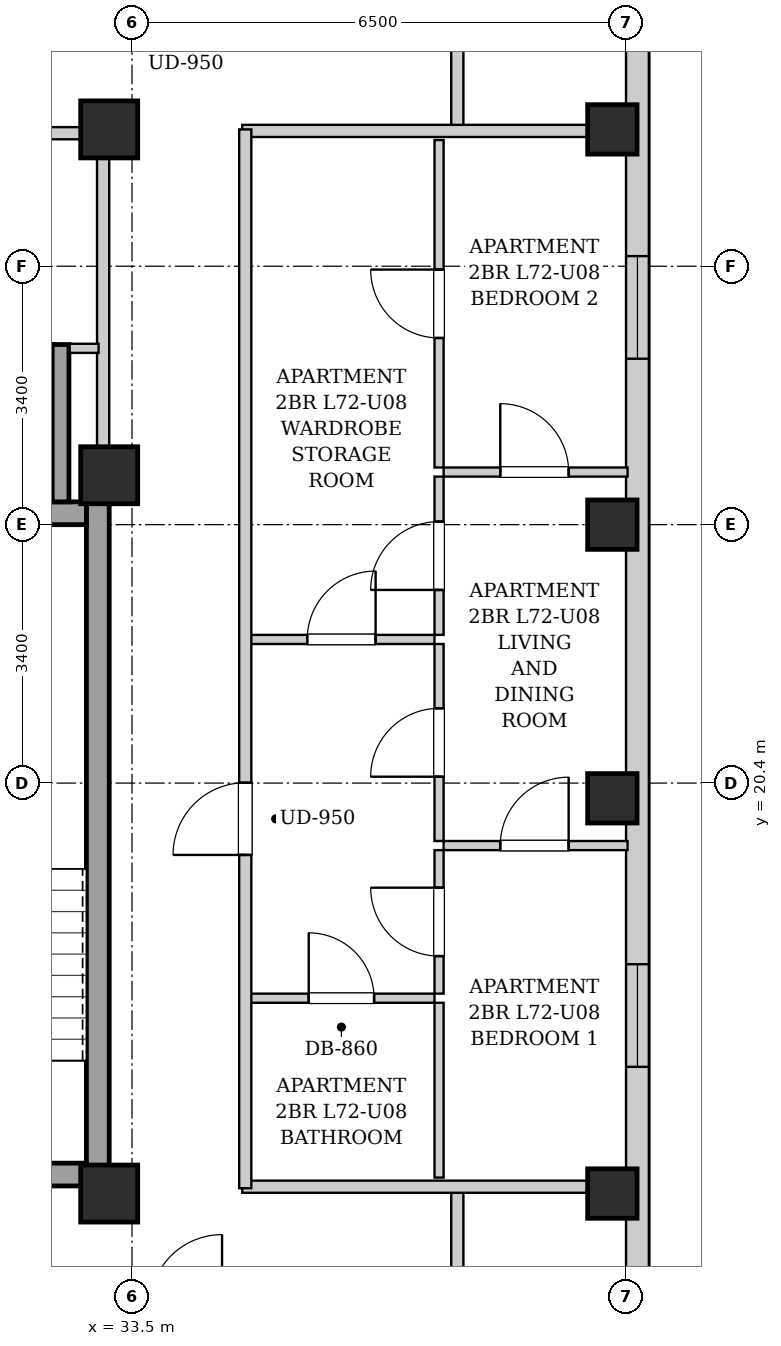
"""IFC4 building model, lengths in metres.
Left out: names, types, materials, properties, quantities, classifications, styles, units other than length and angle.
Written with IfcOpenShell. Run it as: python <this file> out.ifc"""

import sys

from ifc_helpers import new_model, si_unit, direction, frame, frame_2d, origin, origin_2d, place, context, subcontext, project, spatial, rectangle, extrude, element, fill, save


model = new_model("IFC4")
c1 = context("Model", 3, precision=1e-05, world=origin(), true_north=direction((0.0, 1.0)))
c2 = subcontext(c1, "Body", "Model", "MODEL_VIEW")
j1 = project(units=[si_unit("LENGTHUNIT", "METRE"), si_unit("PLANEANGLEUNIT", "RADIAN")], contexts=[c1])
p1 = place(None, origin())
s1 = spatial("IfcSite", under=j1, at=p1, CompositionType="ELEMENT")
p2 = place(p1, origin())
s2 = spatial("IfcBuilding", under=s1, at=p2, CompositionType="ELEMENT")
p3 = place(p2, frame((0.0, 0.0, 247.9)))
s3 = spatial("IfcBuildingStorey", under=s2, at=p3, CompositionType="ELEMENT", Elevation=247.9)
for number, where, z_axis, x_axis in (
    (1, (39.82, 15.0, 0.0), (0.0, 0.0, 1.0), (1.0, 0.0, 0.0)),
    (2, (39.82, 20.2, 0.0), (0.0, 0.0, 1.0), (1.0, 0.0, 0.0)),
    (3, (39.82, 23.8, 0.0), (0.0, 0.0, 1.0), (1.0, 0.0, 0.0)),
    (4, (39.82, 29.0, 0.0), (0.0, 0.0, 1.0), (1.0, 0.0, 0.0)),
):
    element("IfcColumn", number, at=place(p3, frame(where, z_axis=z_axis, x_axis=x_axis)), inside=s3, PredefinedType="COLUMN", context=c2, shape_type="SweptSolid", body=[
        extrude(rectangle(XDim=0.65, YDim=0.65, at=origin_2d()), origin(), (0.0, 0.0, 1.0), 3.4),
    ])
for number, where, z_axis, x_axis in (
    (5, (33.2, 15.0, 0.0), (0.0, 0.0, 1.0), (1.0, 0.0, 0.0)),
    (6, (33.2, 29.0, 0.0), (0.0, 0.0, 1.0), (1.0, 0.0, 0.0)),
    (7, (33.2, 24.45, 0.0), (0.0, 0.0, 1.0), (1.0, 0.0, 0.0)),
):
    element("IfcColumn", number, at=place(p3, frame(where, z_axis=z_axis, x_axis=x_axis)), inside=s3, PredefinedType="COLUMN", context=c2, shape_type="SweptSolid", body=[
        extrude(rectangle(XDim=0.75, YDim=0.75, at=origin_2d()), origin(), (0.0, 0.0, 1.0), 3.4),
    ])
p4 = place(p3, frame((40.15, 37.7, 0.0), z_axis=(0.0, 0.0, 1.0), x_axis=(0.0, -1.0, 0.0)))
e8 = element("IfcWall", 8, at=p4, inside=s3, PredefinedType="SOLIDWALL", context=c2, shape_type="SweptSolid", body=[
    extrude(rectangle(XDim=31.4, YDim=0.3, at=frame_2d((15.7, 0.0))), origin(), (0.0, 0.0, 1.0), 3.14),
])
p5 = place(p4, frame((28.546, 0.0, 0.55)))
e9 = element("IfcOpeningElement", 9, at=p5, cuts=e8, PredefinedType="OPENING", context=c2, shape_type="SweptSolid", body=[
    extrude(rectangle(XDim=1.35, YDim=1.2, at=frame_2d((0.675, 0.6))), frame((0.0, 0.16, 0.0), z_axis=(0.0, -1.0, 0.0), x_axis=(1.0, 0.0, 0.0)), (0.0, 0.0, 1.0), 0.32),
])
p6 = place(p4, frame((1.504, 0.0, 0.55)))
e10 = element("IfcOpeningElement", 10, at=p6, cuts=e8, PredefinedType="OPENING", context=c2, shape_type="SweptSolid", body=[
    extrude(rectangle(XDim=1.35, YDim=1.2, at=frame_2d((0.675, 0.6))), frame((0.0, 0.16, 0.0), z_axis=(0.0, -1.0, 0.0), x_axis=(1.0, 0.0, 0.0)), (0.0, 0.0, 1.0), 0.32),
])
p7 = place(p4, frame((19.683, 0.0, 0.55)))
e11 = element("IfcOpeningElement", 11, at=p7, cuts=e8, PredefinedType="OPENING", context=c2, shape_type="SweptSolid", body=[
    extrude(rectangle(XDim=1.35, YDim=1.2, at=frame_2d((0.675, 0.6))), frame((0.0, 0.16, 0.0), z_axis=(0.0, -1.0, 0.0), x_axis=(1.0, 0.0, 0.0)), (0.0, 0.0, 1.0), 0.32),
])
p8 = place(p4, frame((10.367, 0.0, 0.55)))
e12 = element("IfcOpeningElement", 12, at=p8, cuts=e8, PredefinedType="OPENING", context=c2, shape_type="SweptSolid", body=[
    extrude(rectangle(XDim=1.35, YDim=1.2, at=frame_2d((0.675, 0.6))), frame((0.0, 0.16, 0.0), z_axis=(0.0, -1.0, 0.0), x_axis=(1.0, 0.0, 0.0)), (0.0, 0.0, 1.0), 0.32),
])
p9 = place(p3, frame((33.05, 15.1, 0.0), z_axis=(0.0, 0.0, 1.0), x_axis=(0.0, 1.0, 0.0)))
e13 = element("IfcWall", 13, at=p9, inside=s3, PredefinedType="SHEAR", context=c2, shape_type="SweptSolid", body=[
    extrude(rectangle(XDim=9.0, YDim=0.3, at=frame_2d((4.5, 0.0))), origin(), (0.0, 0.0, 1.0), 3.14),
])
p10 = place(p3, frame((30.05, 23.95, 0.0), z_axis=(0.0, 0.0, 1.0), x_axis=(1.0, 0.0, 0.0)))
e14 = element("IfcWall", 14, at=p10, inside=s3, PredefinedType="SHEAR", context=c2, shape_type="SweptSolid", body=[
    extrude(rectangle(XDim=2.85, YDim=0.3, at=frame_2d((1.425, 0.0))), origin(), (0.0, 0.0, 1.0), 3.14),
])
p11 = place(p3, frame((30.05, 15.25, 0.0), z_axis=(0.0, 0.0, 1.0), x_axis=(1.0, 0.0, 0.0)))
e15 = element("IfcWall", 15, at=p11, inside=s3, PredefinedType="SHEAR", context=c2, shape_type="SweptSolid", body=[
    extrude(rectangle(XDim=2.85, YDim=0.3, at=frame_2d((1.425, 0.0))), origin(), (0.0, 0.0, 1.0), 3.14),
])
p12 = place(p11, frame((0.86, 0.0, 0.0)))
e16 = element("IfcOpeningElement", 16, at=p12, cuts=e15, PredefinedType="OPENING", context=c2, shape_type="SweptSolid", body=[
    extrude(rectangle(XDim=1.1, YDim=2.05, at=frame_2d((0.55, 1.025))), frame((0.0, 0.16, 0.0), z_axis=(0.0, -1.0, 0.0), x_axis=(1.0, 0.0, 0.0)), (0.0, 0.0, 1.0), 0.32),
])
p13 = place(p3, frame((32.56, 24.1, 0.0), z_axis=(0.0, 0.0, 1.0), x_axis=(0.0, 1.0, 0.0)))
e17 = element("IfcWall", 17, at=p13, inside=s3, PredefinedType="SHEAR", context=c2, shape_type="SweptSolid", body=[
    extrude(rectangle(XDim=2.07, YDim=0.22, at=frame_2d((1.035, 0.0))), origin(), (0.0, 0.0, 1.0), 3.14),
])
p14 = place(p3, frame((33.12, 24.12, 0.0), z_axis=(0.0, 0.0, 1.0), x_axis=(0.0, 1.0, 0.0)))
e18 = element("IfcWall", 18, at=p14, inside=s3, PredefinedType="PARTITIONING", context=c2, shape_type="SweptSolid", body=[
    extrude(rectangle(XDim=4.76, YDim=0.16, at=frame_2d((2.38, 0.0))), origin(), (0.0, 0.0, 1.0), 2.475),
])
p15 = place(p3, frame((32.68, 26.12, 0.0), z_axis=(0.0, 0.0, 1.0), x_axis=(1.0, 0.0, 0.0)))
e19 = element("IfcWall", 19, at=p15, inside=s3, PredefinedType="PARTITIONING", context=c2, shape_type="SweptSolid", body=[
    extrude(rectangle(XDim=0.38, YDim=0.12, at=frame_2d((0.19, 0.0))), origin(), (0.0, 0.0, 1.0), 3.14),
])
p16 = place(p3, frame((30.08, 28.95, 0.0), z_axis=(0.0, 0.0, 1.0), x_axis=(1.0, 0.0, 0.0)))
e20 = element("IfcWall", 20, at=p16, inside=s3, PredefinedType="PARTITIONING", context=c2, shape_type="SweptSolid", body=[
    extrude(rectangle(XDim=2.96, YDim=0.16, at=frame_2d((1.48, 0.0))), origin(), (0.0, 0.0, 1.0), 3.14),
])
p17 = place(p16, frame((1.045, 0.0, 0.0)))
e21 = element("IfcOpeningElement", 21, at=p17, cuts=e20, PredefinedType="OPENING", context=c2, shape_type="SweptSolid", body=[
    extrude(rectangle(XDim=0.86, YDim=2.05, at=frame_2d((0.43, 1.025))), frame((0.0, 0.09, 0.0), z_axis=(0.0, -1.0, 0.0), x_axis=(1.0, 0.0, 0.0)), (0.0, 0.0, 1.0), 0.18),
])
for number, where, z_axis, x_axis in (
    (22, (37.78, 13.51, 0.0), (0.0, 0.0, 1.0), (0.0, 1.0, 0.0)),
    (23, (37.78, 28.98, 0.0), (0.0, 0.0, 1.0), (0.0, 1.0, 0.0)),
):
    element("IfcWall", number, at=place(p3, frame(where, z_axis=z_axis, x_axis=x_axis)), inside=s3, PredefinedType="PARTITIONING", context=c2, shape_type="SweptSolid", body=[
        extrude(rectangle(XDim=1.58, YDim=0.16, at=frame_2d((0.79, 0.0))), origin(), (0.0, 0.0, 1.0), 3.14),
    ])
for number, where, z_axis, x_axis in (
    (24, (34.95, 15.09, 0.0), (0.0, 0.0, 1.0), (1.0, 0.0, 0.0)),
    (25, (34.95, 28.98, 0.0), (0.0, 0.0, 1.0), (1.0, 0.0, 0.0)),
):
    element("IfcWall", number, at=place(p3, frame(where, z_axis=z_axis, x_axis=x_axis)), inside=s3, PredefinedType="PARTITIONING", context=c2, shape_type="SweptSolid", body=[
        extrude(rectangle(XDim=5.07, YDim=0.16, at=frame_2d((2.535, 0.0))), origin(), (0.0, 0.0, 1.0), 2.668),
    ])
p18 = place(p3, frame((35.03, 22.29, 0.0), z_axis=(0.0, 0.0, 1.0), x_axis=(1.0, 0.0, 0.0)))
e26 = element("IfcWall", 26, at=p18, inside=s3, PredefinedType="PARTITIONING", context=c2, shape_type="SweptSolid", body=[
    extrude(rectangle(XDim=2.45, YDim=0.12, at=frame_2d((1.225, 0.0))), origin(), (0.0, 0.0, 1.0), 3.14),
])
p19 = place(p18, frame((0.775, 0.0, 0.0)))
e27 = element("IfcOpeningElement", 27, at=p19, cuts=e26, PredefinedType="OPENING", context=c2, shape_type="SweptSolid", body=[
    extrude(rectangle(XDim=0.9, YDim=2.05, at=frame_2d((0.45, 1.025))), frame((0.0, 0.07, 0.0), z_axis=(0.0, -1.0, 0.0), x_axis=(1.0, 0.0, 0.0)), (0.0, 0.0, 1.0), 0.14),
])
p20 = place(p3, frame((37.54, 22.35, 0.0), z_axis=(0.0, 0.0, 1.0), x_axis=(0.0, 1.0, 0.0)))
e28 = element("IfcWall", 28, at=p20, inside=s3, PredefinedType="PARTITIONING", context=c2, shape_type="SweptSolid", body=[
    extrude(rectangle(XDim=2.082, YDim=0.12, at=frame_2d((1.041, 0.0))), origin(), (0.0, 0.0, 1.0), 3.14),
])
p21 = place(p20, frame((0.591, 0.0, 0.0)))
e29 = element("IfcOpeningElement", 29, at=p21, cuts=e28, PredefinedType="OPENING", context=c2, shape_type="SweptSolid", body=[
    extrude(rectangle(XDim=0.9, YDim=2.05, at=frame_2d((0.45, 1.025))), frame((0.0, 0.07, 0.0), z_axis=(0.0, -1.0, 0.0), x_axis=(1.0, 0.0, 0.0)), (0.0, 0.0, 1.0), 0.14),
])
p22 = place(p3, frame((37.54, 24.552, 0.0), z_axis=(0.0, 0.0, 1.0), x_axis=(0.0, 1.0, 0.0)))
e30 = element("IfcWall", 30, at=p22, inside=s3, PredefinedType="PARTITIONING", context=c2, shape_type="SweptSolid", body=[
    extrude(rectangle(XDim=4.308, YDim=0.12, at=frame_2d((2.154, 0.0))), origin(), (0.0, 0.0, 1.0), 3.14),
])
p23 = place(p22, frame((1.704, 0.0, 0.0)))
e31 = element("IfcOpeningElement", 31, at=p23, cuts=e30, PredefinedType="OPENING", context=c2, shape_type="SweptSolid", body=[
    extrude(rectangle(XDim=0.9, YDim=2.05, at=frame_2d((0.45, 1.025))), frame((0.0, 0.07, 0.0), z_axis=(0.0, -1.0, 0.0), x_axis=(1.0, 0.0, 0.0)), (0.0, 0.0, 1.0), 0.14),
])
p24 = place(p3, frame((35.03, 17.57, 0.0), z_axis=(0.0, 0.0, 1.0), x_axis=(1.0, 0.0, 0.0)))
e32 = element("IfcWall", 32, at=p24, inside=s3, PredefinedType="PARTITIONING", context=c2, shape_type="SweptSolid", body=[
    extrude(rectangle(XDim=2.45, YDim=0.12, at=frame_2d((1.225, 0.0))), origin(), (0.0, 0.0, 1.0), 3.14),
])
p25 = place(p24, frame((0.795, 0.0, 0.0)))
e33 = element("IfcOpeningElement", 33, at=p25, cuts=e32, PredefinedType="OPENING", context=c2, shape_type="SweptSolid", body=[
    extrude(rectangle(XDim=0.86, YDim=2.05, at=frame_2d((0.43, 1.025))), frame((0.0, 0.07, 0.0), z_axis=(0.0, -1.0, 0.0), x_axis=(1.0, 0.0, 0.0)), (0.0, 0.0, 1.0), 0.14),
])
p26 = place(p3, frame((37.54, 15.21, 0.0), z_axis=(0.0, 0.0, 1.0), x_axis=(0.0, 1.0, 0.0)))
e34 = element("IfcWall", 34, at=p26, inside=s3, PredefinedType="PARTITIONING", context=c2, shape_type="SweptSolid", body=[
    extrude(rectangle(XDim=2.3, YDim=0.12, at=frame_2d((1.15, 0.0))), origin(), (0.0, 0.0, 1.0), 3.14),
])
p27 = place(p3, frame((37.54, 17.63, 0.0), z_axis=(0.0, 0.0, 1.0), x_axis=(0.0, 1.0, 0.0)))
e35 = element("IfcWall", 35, at=p27, inside=s3, PredefinedType="PARTITIONING", context=c2, shape_type="SweptSolid", body=[
    extrude(rectangle(XDim=1.888, YDim=0.12, at=frame_2d((0.944, 0.0))), origin(), (0.0, 0.0, 1.0), 3.14),
])
p28 = place(p27, frame((0.494, 0.0, 0.0)))
e36 = element("IfcOpeningElement", 36, at=p28, cuts=e35, PredefinedType="OPENING", context=c2, shape_type="SweptSolid", body=[
    extrude(rectangle(XDim=0.9, YDim=2.05, at=frame_2d((0.45, 1.025))), frame((0.0, 0.07, 0.0), z_axis=(0.0, -1.0, 0.0), x_axis=(1.0, 0.0, 0.0)), (0.0, 0.0, 1.0), 0.14),
])
p29 = place(p3, frame((37.54, 19.638, 0.0), z_axis=(0.0, 0.0, 1.0), x_axis=(0.0, 1.0, 0.0)))
e37 = element("IfcWall", 37, at=p29, inside=s3, PredefinedType="PARTITIONING", context=c2, shape_type="SweptSolid", body=[
    extrude(rectangle(XDim=2.592, YDim=0.12, at=frame_2d((1.296, 0.0))), origin(), (0.0, 0.0, 1.0), 3.14),
])
p30 = place(p29, frame((0.846, 0.0, 0.0)))
e38 = element("IfcOpeningElement", 38, at=p30, cuts=e37, PredefinedType="OPENING", context=c2, shape_type="SweptSolid", body=[
    extrude(rectangle(XDim=0.9, YDim=2.05, at=frame_2d((0.45, 1.025))), frame((0.0, 0.07, 0.0), z_axis=(0.0, -1.0, 0.0), x_axis=(1.0, 0.0, 0.0)), (0.0, 0.0, 1.0), 0.14),
])
p31 = place(p3, frame((37.6, 19.578, 0.0), z_axis=(0.0, 0.0, 1.0), x_axis=(1.0, 0.0, 0.0)))
e39 = element("IfcWall", 39, at=p31, inside=s3, PredefinedType="PARTITIONING", context=c2, shape_type="SweptSolid", body=[
    extrude(rectangle(XDim=2.42, YDim=0.12, at=frame_2d((1.21, 0.0))), origin(), (0.0, 0.0, 1.0), 3.14),
])
p32 = place(p31, frame((0.745, 0.0, 0.0)))
e40 = element("IfcOpeningElement", 40, at=p32, cuts=e39, PredefinedType="OPENING", context=c2, shape_type="SweptSolid", body=[
    extrude(rectangle(XDim=0.9, YDim=2.05, at=frame_2d((0.45, 1.025))), frame((0.0, 0.07, 0.0), z_axis=(0.0, -1.0, 0.0), x_axis=(1.0, 0.0, 0.0)), (0.0, 0.0, 1.0), 0.14),
])
p33 = place(p3, frame((37.6, 24.492, 0.0), z_axis=(0.0, 0.0, 1.0), x_axis=(1.0, 0.0, 0.0)))
e41 = element("IfcWall", 41, at=p33, inside=s3, PredefinedType="PARTITIONING", context=c2, shape_type="SweptSolid", body=[
    extrude(rectangle(XDim=2.42, YDim=0.12, at=frame_2d((1.21, 0.0))), origin(), (0.0, 0.0, 1.0), 2.878),
])
p34 = place(p33, frame((0.745, 0.0, 0.0)))
e42 = element("IfcOpeningElement", 42, at=p34, cuts=e41, PredefinedType="OPENING", context=c2, shape_type="SweptSolid", body=[
    extrude(rectangle(XDim=0.9, YDim=2.05, at=frame_2d((0.45, 1.025))), frame((0.0, 0.07, 0.0), z_axis=(0.0, -1.0, 0.0), x_axis=(1.0, 0.0, 0.0)), (0.0, 0.0, 1.0), 0.14),
])
p35 = place(p3, frame((34.99, 15.07, 0.0), z_axis=(0.0, 0.0, 1.0), x_axis=(0.0, 1.0, 0.0)))
e43 = element("IfcWall", 43, at=p35, inside=s3, PredefinedType="PARTITIONING", context=c2, shape_type="SweptSolid", body=[
    extrude(rectangle(XDim=13.93, YDim=0.16, at=frame_2d((6.965, 0.0))), origin(), (0.0, 0.0, 1.0), 3.14),
])
p36 = place(p35, frame((4.385, 0.0, 0.0)))
e44 = element("IfcOpeningElement", 44, at=p36, cuts=e43, PredefinedType="OPENING", context=c2, shape_type="SweptSolid", body=[
    extrude(rectangle(XDim=0.95, YDim=2.1, at=frame_2d((0.475, 1.05))), frame((0.0, 0.09, 0.0), z_axis=(0.0, -1.0, 0.0), x_axis=(1.0, 0.0, 0.0)), (0.0, 0.0, 1.0), 0.18),
])
p37 = place(p19, origin())
e45 = element("IfcDoor", 45, at=p37, inside=s3, OperationType="SINGLE_SWING_RIGHT", PredefinedType="DOOR", context=c2, shape_type="SweptSolid", body=[
    extrude(rectangle(XDim=0.9, YDim=2.05, at=frame_2d((0.45, 1.025))), frame((0.0, 0.025, 0.0), z_axis=(0.0, -1.0, 0.0), x_axis=(1.0, 0.0, 0.0)), (0.0, 0.0, 1.0), 0.05),
])
fill(e27, e45)
p38 = place(p21, origin())
e46 = element("IfcDoor", 46, at=p38, inside=s3, OperationType="SINGLE_SWING_LEFT", PredefinedType="DOOR", context=c2, shape_type="SweptSolid", body=[
    extrude(rectangle(XDim=0.9, YDim=2.05, at=frame_2d((0.45, 1.025))), frame((0.0, 0.025, 0.0), z_axis=(0.0, -1.0, 0.0), x_axis=(1.0, 0.0, 0.0)), (0.0, 0.0, 1.0), 0.05),
])
fill(e29, e46)
p39 = place(p23, origin())
e47 = element("IfcDoor", 47, at=p39, inside=s3, OperationType="SINGLE_SWING_RIGHT", PredefinedType="DOOR", context=c2, shape_type="SweptSolid", body=[
    extrude(rectangle(XDim=0.9, YDim=2.05, at=frame_2d((0.45, 1.025))), frame((0.0, 0.025, 0.0), z_axis=(0.0, -1.0, 0.0), x_axis=(1.0, 0.0, 0.0)), (0.0, 0.0, 1.0), 0.05),
])
fill(e31, e47)
p40 = place(p25, origin())
e48 = element("IfcDoor", 48, at=p40, inside=s3, OperationType="SINGLE_SWING_LEFT", PredefinedType="DOOR", context=c2, shape_type="SweptSolid", body=[
    extrude(rectangle(XDim=0.86, YDim=2.05, at=frame_2d((0.43, 1.025))), frame((0.0, 0.025, 0.0), z_axis=(0.0, -1.0, 0.0), x_axis=(1.0, 0.0, 0.0)), (0.0, 0.0, 1.0), 0.05),
])
fill(e33, e48)
p41 = place(p28, origin())
e49 = element("IfcDoor", 49, at=p41, inside=s3, OperationType="SINGLE_SWING_RIGHT", PredefinedType="DOOR", context=c2, shape_type="SweptSolid", body=[
    extrude(rectangle(XDim=0.9, YDim=2.05, at=frame_2d((0.45, 1.025))), frame((0.0, 0.025, 0.0), z_axis=(0.0, -1.0, 0.0), x_axis=(1.0, 0.0, 0.0)), (0.0, 0.0, 1.0), 0.05),
])
fill(e36, e49)
p42 = place(p30, origin())
e50 = element("IfcDoor", 50, at=p42, inside=s3, OperationType="SINGLE_SWING_LEFT", PredefinedType="DOOR", context=c2, shape_type="SweptSolid", body=[
    extrude(rectangle(XDim=0.9, YDim=2.05, at=frame_2d((0.45, 1.025))), frame((0.0, 0.025, 0.0), z_axis=(0.0, -1.0, 0.0), x_axis=(1.0, 0.0, 0.0)), (0.0, 0.0, 1.0), 0.05),
])
fill(e38, e50)
p43 = place(p32, origin())
e51 = element("IfcDoor", 51, at=p43, inside=s3, OperationType="SINGLE_SWING_RIGHT", PredefinedType="DOOR", context=c2, shape_type="SweptSolid", body=[
    extrude(rectangle(XDim=0.9, YDim=2.05, at=frame_2d((0.45, 1.025))), frame((0.0, 0.025, 0.0), z_axis=(0.0, -1.0, 0.0), x_axis=(1.0, 0.0, 0.0)), (0.0, 0.0, 1.0), 0.05),
])
fill(e40, e51)
p44 = place(p34, origin())
e52 = element("IfcDoor", 52, at=p44, inside=s3, OperationType="SINGLE_SWING_LEFT", PredefinedType="DOOR", context=c2, shape_type="SweptSolid", body=[
    extrude(rectangle(XDim=0.9, YDim=2.05, at=frame_2d((0.45, 1.025))), frame((0.0, 0.025, 0.0), z_axis=(0.0, -1.0, 0.0), x_axis=(1.0, 0.0, 0.0)), (0.0, 0.0, 1.0), 0.05),
])
fill(e42, e52)
p45 = place(p36, origin())
e53 = element("IfcDoor", 53, at=p45, inside=s3, OperationType="SINGLE_SWING_LEFT", PredefinedType="DOOR", context=c2, shape_type="SweptSolid", body=[
    extrude(rectangle(XDim=0.95, YDim=2.1, at=frame_2d((0.475, 1.05))), frame((0.0, 0.025, 0.0), z_axis=(0.0, -1.0, 0.0), x_axis=(1.0, 0.0, 0.0)), (0.0, 0.0, 1.0), 0.05),
])
fill(e44, e53)
p46 = place(p7, origin())
e54 = element("IfcWindow", 54, at=p46, inside=s3, PartitioningType="SINGLE_PANEL", PredefinedType="WINDOW", context=c2, shape_type="SweptSolid", body=[
    extrude(rectangle(XDim=1.35, YDim=1.2, at=frame_2d((0.675, 0.6))), frame((0.0, 0.03, 0.0), z_axis=(0.0, -1.0, 0.0), x_axis=(1.0, 0.0, 0.0)), (0.0, 0.0, 1.0), 0.06),
])
fill(e11, e54)
p47 = place(p8, origin())
e55 = element("IfcWindow", 55, at=p47, inside=s3, PartitioningType="SINGLE_PANEL", PredefinedType="WINDOW", context=c2, shape_type="SweptSolid", body=[
    extrude(rectangle(XDim=1.35, YDim=1.2, at=frame_2d((0.675, 0.6))), frame((0.0, 0.03, 0.0), z_axis=(0.0, -1.0, 0.0), x_axis=(1.0, 0.0, 0.0)), (0.0, 0.0, 1.0), 0.06),
])
fill(e12, e55)
save(model, sys.argv[1])
